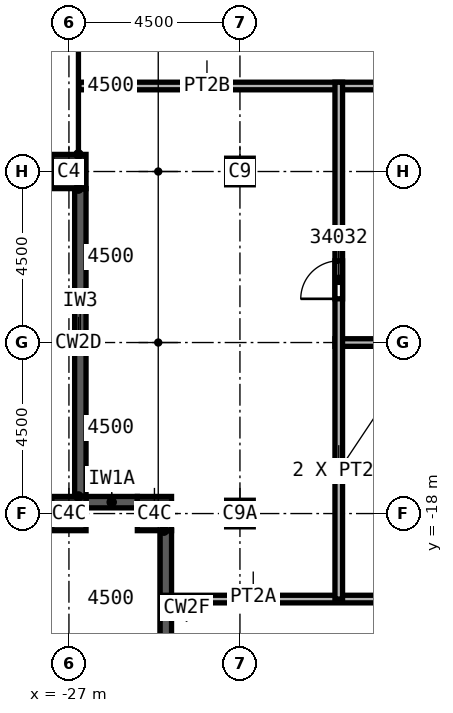
"""IFC4 building model, lengths in metres.
Left out: names, types, materials, properties, quantities, classifications, styles, units other than length and angle.
Written with IfcOpenShell. Run it as: python <this file> out.ifc"""

import sys

from ifc_helpers import new_model, si_unit, direction, frame, frame_2d, origin, origin_2d, place, context, subcontext, project, spatial, polyline, rectangle, outline, extrude, element, fill, save


model = new_model("IFC4")
c1 = context("Model", 3, precision=1e-05, world=origin(), true_north=direction((0.0, 1.0)))
c2 = subcontext(c1, "Body", "Model", "MODEL_VIEW")
j1 = project(units=[si_unit("LENGTHUNIT", "METRE"), si_unit("PLANEANGLEUNIT", "RADIAN")], contexts=[c1])
p1 = place(None, origin())
s1 = spatial("IfcSite", under=j1, at=p1, CompositionType="ELEMENT")
p2 = place(p1, origin())
s2 = spatial("IfcBuilding", under=s1, at=p2, CompositionType="ELEMENT")
p3 = place(p2, frame((0.0, 0.0, 366.0)))
s3 = spatial("IfcBuildingStorey", under=s2, at=p3, CompositionType="ELEMENT", Elevation=366.0)
p4 = place(p3, frame((-22.5, -9.0, 0.0), z_axis=(0.0, 0.0, 1.0), x_axis=(1.0, 0.0, 0.0)))
e1 = element("IfcColumn", 1, at=p4, inside=s3, PredefinedType="COLUMN", context=c2, shape_type="SweptSolid", body=[
    extrude(rectangle(XDim=0.7, YDim=0.7, at=origin_2d()), origin(), (0.0, 0.0, 1.0), 9.6),
])
p5 = place(p3, frame((-22.5, -18.0, 0.0), z_axis=(0.0, 0.0, 1.0), x_axis=(1.0, 0.0, 0.0)))
e2 = element("IfcColumn", 2, at=p5, inside=s3, PredefinedType="COLUMN", context=c2, shape_type="SweptSolid", body=[
    extrude(rectangle(XDim=0.7, YDim=0.7, at=origin_2d()), origin(), (0.0, 0.0, 1.0), 9.532),
])
p6 = place(p3, frame((-27.0, -9.0, 0.0), z_axis=(0.0, 0.0, 1.0), x_axis=(0.0, 1.0, 0.0)))
e3 = element("IfcColumn", 3, at=p6, inside=s3, PredefinedType="COLUMN", context=c2, shape_type="SweptSolid", body=[
    extrude(rectangle(XDim=0.9, YDim=0.9, at=origin_2d()), origin(), (0.0, 0.0, 1.0), 9.6),
])
for number, where, z_axis, x_axis in (
    (4, (-27.0, -18.0, 0.0), (0.0, 0.0, 1.0), (0.0, 1.0, 0.0)),
    (5, (-24.75, -18.0, 0.0), (0.0, 0.0, 1.0), (1.0, 0.0, 0.0)),
):
    element("IfcColumn", number, at=place(p3, frame(where, z_axis=z_axis, x_axis=x_axis)), inside=s3, PredefinedType="COLUMN", context=c2, shape_type="SweptSolid", body=[
        extrude(rectangle(XDim=0.9, YDim=0.9, at=origin_2d()), origin(), (0.0, 0.0, 1.0), 9.532),
    ])
p7 = place(p3, frame((-26.7, -9.45, 10.246), z_axis=(0.0, 0.0, 1.0), x_axis=(0.0, -1.0, 0.0)))
e6 = element("IfcWall", 6, at=p7, inside=s3, PredefinedType="SOLIDWALL", context=c2, shape_type="SweptSolid", body=[
    extrude(outline(polyline([(0.0, 0.0), (8.1, 0.0), (8.1, 0.05), (0.0, 3.728), (0.0, 0.0)])), frame((0.0, 0.15, 0.0), z_axis=(0.0, -1.0, 0.0), x_axis=(1.0, 0.0, 0.0)), (0.0, 0.0, 1.0), 0.3),
])
p8 = place(p3, frame((-26.55, -17.7, 0.0), z_axis=(0.0, 0.0, 1.0), x_axis=(1.0, 0.0, 0.0)))
e7 = element("IfcWall", 7, at=p8, inside=s3, PredefinedType="SOLIDWALL", context=c2, shape_type="SweptSolid", body=[
    extrude(rectangle(XDim=1.35, YDim=0.3, at=frame_2d((0.675, 0.0))), origin(), (0.0, 0.0, 1.0), 10.013),
])
p9 = place(p3, frame((-24.45, -18.45, 7.939), z_axis=(0.0, 0.0, 1.0), x_axis=(0.0, -1.0, 0.0)))
e8 = element("IfcWall", 8, at=p9, inside=s3, PredefinedType="SOLIDWALL", context=c2, shape_type="SweptSolid", body=[
    extrude(outline(polyline([(0.0, 0.0), (4.05, 0.0), (4.05, 0.05), (0.0, 1.841), (0.0, 0.0)])), frame((0.0, 0.15, 0.0), z_axis=(0.0, -1.0, 0.0), x_axis=(1.0, 0.0, 0.0)), (0.0, 0.0, 1.0), 0.3),
])
p10 = place(p3, frame((-26.736, -6.75, 0.0), z_axis=(0.0, 0.0, 1.0), x_axis=(1.0, 0.0, 0.0)))
e9 = element("IfcWall", 9, at=p10, inside=s3, PredefinedType="PARTITIONING", context=c2, shape_type="SweptSolid", body=[
    extrude(rectangle(XDim=11.336, YDim=0.2, at=frame_2d((5.668, 0.0))), origin(), (0.0, 0.0, 1.0), 9.115),
])
p11 = place(p3, frame((-24.486, -20.25, 0.0), z_axis=(0.0, 0.0, 1.0), x_axis=(1.0, 0.0, 0.0)))
e10 = element("IfcWall", 10, at=p11, inside=s3, PredefinedType="PARTITIONING", context=c2, shape_type="SweptSolid", body=[
    extrude(rectangle(XDim=9.086, YDim=0.2, at=frame_2d((4.543, 0.0))), origin(), (0.0, 0.0, 1.0), 5.76),
])
p12 = place(p3, frame((-20.0, -13.5, 0.0), z_axis=(0.0, 0.0, 1.0), x_axis=(1.0, 0.0, 0.0)))
e11 = element("IfcWall", 11, at=p12, inside=s3, PredefinedType="PARTITIONING", context=c2, shape_type="SweptSolid", body=[
    extrude(rectangle(XDim=4.6, YDim=0.2, at=frame_2d((2.3, 0.0))), origin(), (0.0, 0.0, 1.0), 9.115),
])
p13 = place(p3, frame((-19.9, -20.25, 0.0), z_axis=(0.0, 0.0, 1.0), x_axis=(0.0, 1.0, 0.0)))
e12 = element("IfcWall", 12, at=p13, inside=s3, PredefinedType="PARTITIONING", context=c2, shape_type="SweptSolid", body=[
    extrude(rectangle(XDim=13.6, YDim=0.2, at=frame_2d((6.8, 0.0))), origin(), (0.0, 0.0, 1.0), 9.115),
])
p14 = place(p13, frame((7.9, 0.0, 0.0)))
e13 = element("IfcOpeningElement", 13, at=p14, cuts=e12, PredefinedType="OPENING", context=c2, shape_type="SweptSolid", body=[
    extrude(rectangle(XDim=1.0, YDim=2.1, at=frame_2d((0.5, 1.05))), frame((0.0, 0.1, 0.0), z_axis=(0.0, -1.0, 0.0), x_axis=(1.0, 0.0, 0.0)), (0.0, 0.0, 1.0), 0.2),
])
p15 = place(p14, origin())
e14 = element("IfcDoor", 14, at=p15, inside=s3, OperationType="SINGLE_SWING_LEFT", PredefinedType="DOOR", context=c2, shape_type="SweptSolid", body=[
    extrude(rectangle(XDim=1.0, YDim=2.1, at=frame_2d((0.5, 1.05))), frame((0.0, 0.025, 0.0), z_axis=(0.0, -1.0, 0.0), x_axis=(1.0, 0.0, 0.0)), (0.0, 0.0, 1.0), 0.05),
])
fill(e13, e14)
save(model, sys.argv[1])
